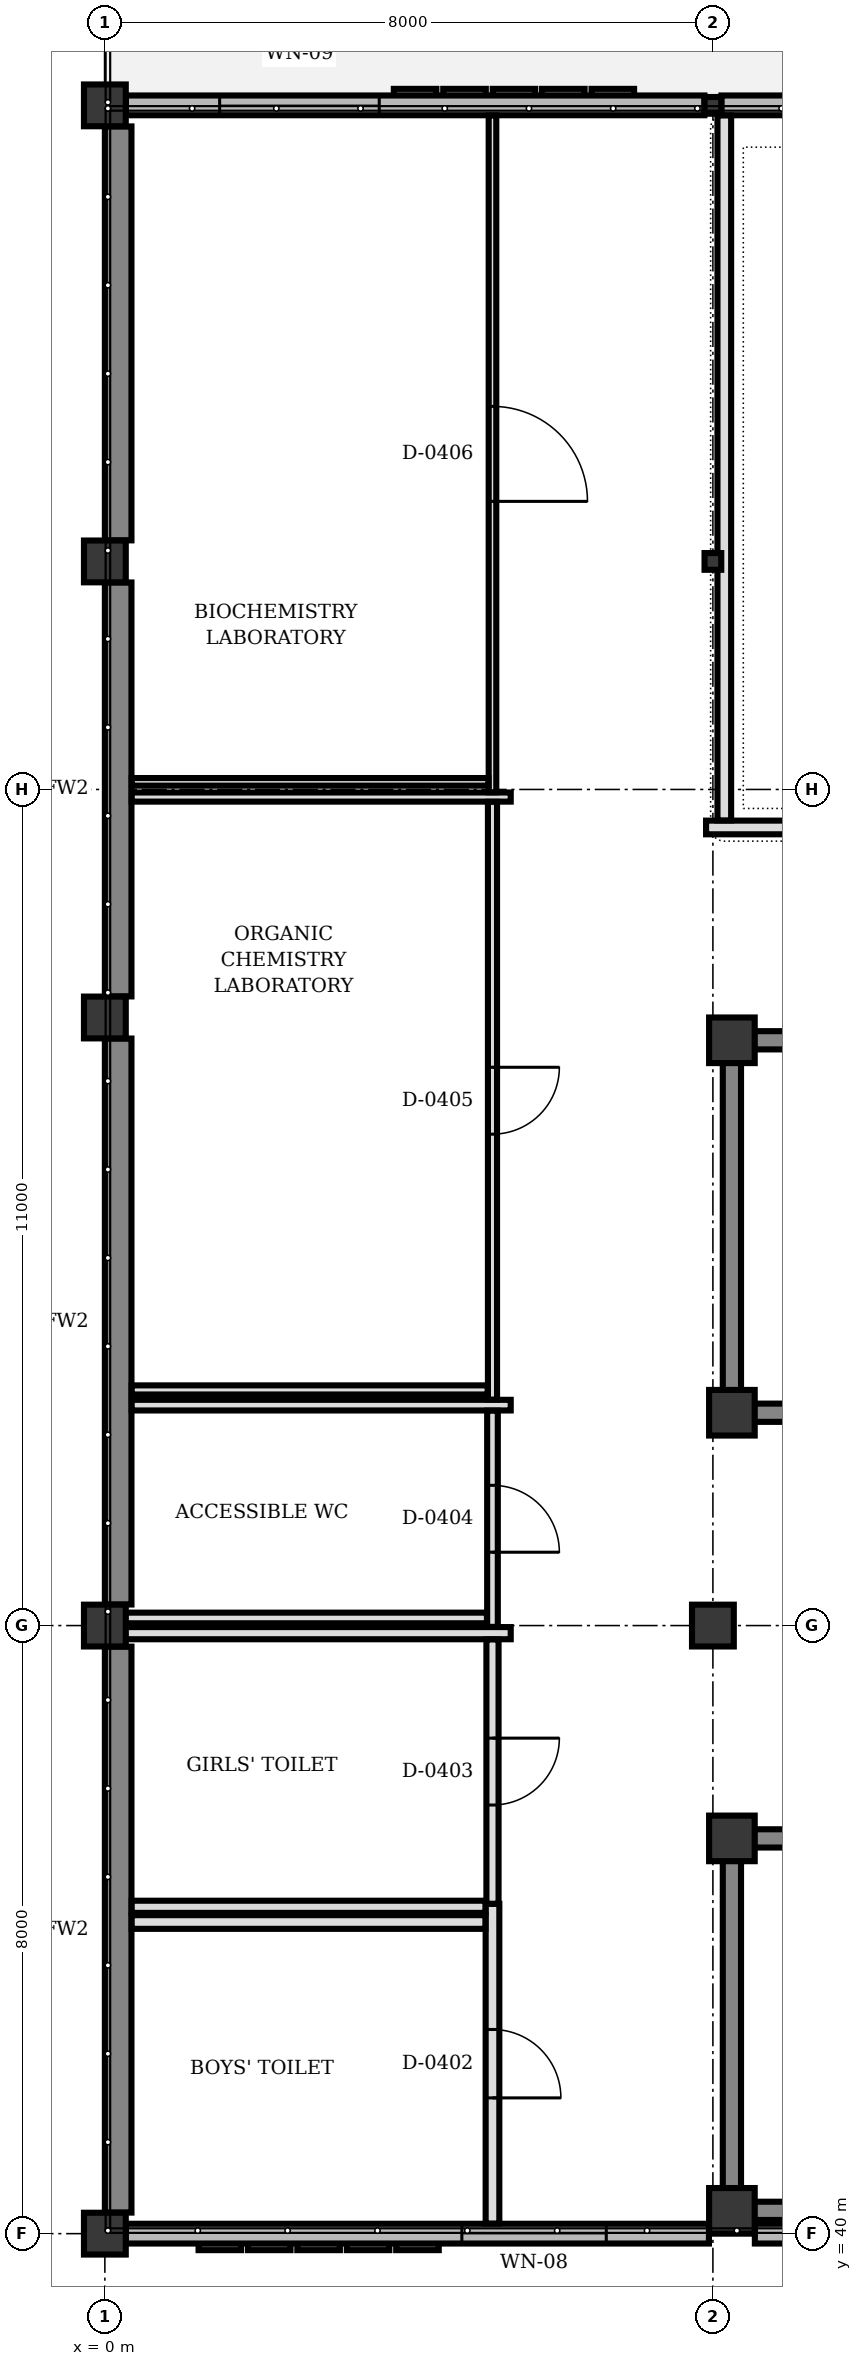
"""IFC4 building model, lengths in metres.
Left out: names, types, materials, properties, quantities, classifications, styles, units other than length and angle.
Written with IfcOpenShell. Run it as: python <this file> out.ifc"""

import sys

from ifc_helpers import new_model, si_unit, direction, frame, frame_2d, origin, origin_2d, place, context, subcontext, project, spatial, rectangle, hollow_rectangle, extrude, element, fill, save


model = new_model("IFC4")
c1 = context("Model", 3, precision=1e-05, world=origin(), true_north=direction((0.0, 1.0)))
c2 = subcontext(c1, "Body", "Model", "MODEL_VIEW")
j1 = project(units=[si_unit("LENGTHUNIT", "METRE"), si_unit("PLANEANGLEUNIT", "RADIAN")], contexts=[c1])
p1 = place(None, origin())
s1 = spatial("IfcSite", under=j1, at=p1, CompositionType="ELEMENT")
p2 = place(p1, origin())
s2 = spatial("IfcBuilding", under=s1, at=p2, CompositionType="ELEMENT")
p3 = place(p2, frame((0.0, 0.0, 16.5)))
s3 = spatial("IfcBuildingStorey", under=s2, at=p3, CompositionType="ELEMENT", Elevation=16.5)
for number, where, z_axis, x_axis in (
    (1, (8.25, 40.3, 0.0), (0.0, 0.0, 1.0), (1.0, 0.0, 0.0)),
    (2, (8.25, 45.2, 0.0), (0.0, 0.0, 1.0), (1.0, 0.0, 0.0)),
    (3, (8.25, 50.8, 0.0), (0.0, 0.0, 1.0), (1.0, 0.0, 0.0)),
    (4, (8.25, 55.7, 0.0), (0.0, 0.0, 1.0), (1.0, 0.0, 0.0)),
):
    element("IfcColumn", number, at=place(p3, frame(where, z_axis=z_axis, x_axis=x_axis)), inside=s3, PredefinedType="COLUMN", context=c2, shape_type="SweptSolid", body=[
        extrude(rectangle(XDim=0.6, YDim=0.6, at=origin_2d()), origin(), (0.0, 0.0, 1.0), 4.0),
    ])
for number, where, z_axis, x_axis in (
    (5, (0.0, 40.0, 0.0), (0.0, 0.0, 1.0), (1.0, 0.0, 0.0)),
    (6, (0.0, 48.0, 0.0), (0.0, 0.0, 1.0), (1.0, 0.0, 0.0)),
    (7, (0.0, 56.0, 0.0), (0.0, 0.0, 1.0), (1.0, 0.0, 0.0)),
    (8, (0.0, 62.0, 0.0), (0.0, 0.0, 1.0), (1.0, 0.0, 0.0)),
    (9, (0.0, 68.0, 0.0), (0.0, 0.0, 1.0), (1.0, 0.0, 0.0)),
    (10, (8.0, 48.0, 0.0), (0.0, 0.0, 1.0), (1.0, 0.0, 0.0)),
):
    element("IfcColumn", number, at=place(p3, frame(where, z_axis=z_axis, x_axis=x_axis)), inside=s3, PredefinedType="COLUMN", context=c2, shape_type="SweptSolid", body=[
        extrude(rectangle(XDim=0.55, YDim=0.55, at=origin_2d()), origin(), (0.0, 0.0, 1.0), 4.0),
    ])
for number, where, z_axis, x_axis in (
    (11, (8.0, 62.0, 0.0), (0.0, 0.0, 1.0), (1.0, 0.0, 0.0)),
    (12, (8.0, 68.0, 0.0), (0.0, 0.0, 1.0), (1.0, 0.0, 0.0)),
):
    element("IfcColumn", number, at=place(p3, frame(where, z_axis=z_axis, x_axis=x_axis)), inside=s3, PredefinedType="COLUMN", context=c2, shape_type="SweptSolid", body=[
        extrude(hollow_rectangle(XDim=0.22, YDim=0.22, WallThickness=0.01, at=origin_2d()), origin(), (0.0, 0.0, 1.0), 4.0),
    ])
p4 = place(p3, frame((0.277, 68.0, 0.0), z_axis=(0.0, 0.0, 1.0), x_axis=(1.0, 0.0, 0.0)))
e13 = element("IfcWall", 13, at=p4, inside=s3, PredefinedType="SOLIDWALL", context=c2, shape_type="SweptSolid", body=[
    extrude(rectangle(XDim=7.611, YDim=0.26, at=frame_2d((3.805, 0.0))), origin(), (0.0, 0.0, 1.0), 3.068),
])
p5 = place(p4, frame((1.233, 0.0, 0.9)))
e14 = element("IfcOpeningElement", 14, at=p5, cuts=e13, PredefinedType="OPENING", context=c2, shape_type="SweptSolid", body=[
    extrude(rectangle(XDim=2.1, YDim=1.1, at=frame_2d((1.05, 0.55))), frame((0.0, 0.14, 0.0), z_axis=(0.0, -1.0, 0.0), x_axis=(1.0, 0.0, 0.0)), (0.0, 0.0, 1.0), 0.28),
])
p6 = place(p3, frame((8.112, 68.0, 0.0), z_axis=(0.0, 0.0, 1.0), x_axis=(1.0, 0.0, 0.0)))
e15 = element("IfcWall", 15, at=p6, inside=s3, PredefinedType="SOLIDWALL", context=c2, shape_type="SweptSolid", body=[
    extrude(rectangle(XDim=7.611, YDim=0.26, at=frame_2d((3.805, 0.0))), origin(), (0.0, 0.0, 1.0), 3.068),
])
p7 = place(p6, frame((3.256, 0.0, 0.0)))
e16 = element("IfcOpeningElement", 16, at=p7, cuts=e15, PredefinedType="OPENING", context=c2, shape_type="SweptSolid", body=[
    extrude(rectangle(XDim=1.1, YDim=2.25, at=frame_2d((0.55, 1.125))), frame((0.0, 0.14, 0.0), z_axis=(0.0, -1.0, 0.0), x_axis=(1.0, 0.0, 0.0)), (0.0, 0.0, 1.0), 0.28),
])
p8 = place(p3, frame((16.0, 40.0, 0.0), z_axis=(0.0, 0.0, 1.0), x_axis=(-1.0, 0.0, 0.0)))
e17 = element("IfcWall", 17, at=p8, inside=s3, PredefinedType="SOLIDWALL", context=c2, shape_type="SweptSolid", body=[
    extrude(rectangle(XDim=7.448, YDim=0.26, at=frame_2d((3.724, 0.0))), origin(), (0.0, 0.0, 1.0), 3.55),
])
p9 = place(p3, frame((7.948, 40.0, 0.0), z_axis=(0.0, 0.0, 1.0), x_axis=(-1.0, 0.0, 0.0)))
e18 = element("IfcWall", 18, at=p9, inside=s3, PredefinedType="SOLIDWALL", context=c2, shape_type="SweptSolid", body=[
    extrude(rectangle(XDim=7.671, YDim=0.26, at=frame_2d((3.835, 0.0))), origin(), (0.0, 0.0, 1.0), 3.55),
])
p10 = place(p9, frame((1.351, 0.0, 0.9)))
e19 = element("IfcOpeningElement", 19, at=p10, cuts=e18, PredefinedType="OPENING", context=c2, shape_type="SweptSolid", body=[
    extrude(rectangle(XDim=1.9, YDim=1.1, at=frame_2d((0.95, 0.55))), frame((0.0, 0.14, 0.0), z_axis=(0.0, -1.0, 0.0), x_axis=(1.0, 0.0, 0.0)), (0.0, 0.0, 1.0), 0.28),
])
p11 = place(p3, frame((0.175, 40.277, 0.0), z_axis=(0.0, 0.0, 1.0), x_axis=(0.0, 1.0, 0.0)))
e20 = element("IfcWall", 20, at=p11, inside=s3, PredefinedType="SHEAR", context=c2, shape_type="SweptSolid", body=[
    extrude(rectangle(XDim=7.446, YDim=0.35, at=frame_2d((3.723, 0.0))), origin(), (0.0, 0.0, 1.0), 3.149),
])
p12 = place(p3, frame((0.175, 48.277, 0.0), z_axis=(0.0, 0.0, 1.0), x_axis=(0.0, 1.0, 0.0)))
e21 = element("IfcWall", 21, at=p12, inside=s3, PredefinedType="SHEAR", context=c2, shape_type="SweptSolid", body=[
    extrude(rectangle(XDim=7.446, YDim=0.35, at=frame_2d((3.723, 0.0))), origin(), (0.0, 0.0, 1.0), 3.223),
])
p13 = place(p3, frame((0.175, 56.277, 0.0), z_axis=(0.0, 0.0, 1.0), x_axis=(0.0, 1.0, 0.0)))
e22 = element("IfcWall", 22, at=p13, inside=s3, PredefinedType="SHEAR", context=c2, shape_type="SweptSolid", body=[
    extrude(rectangle(XDim=5.446, YDim=0.35, at=frame_2d((2.723, 0.0))), origin(), (0.0, 0.0, 1.0), 3.295),
])
p14 = place(p3, frame((0.175, 62.277, 0.0), z_axis=(0.0, 0.0, 1.0), x_axis=(0.0, 1.0, 0.0)))
e23 = element("IfcWall", 23, at=p14, inside=s3, PredefinedType="SHEAR", context=c2, shape_type="SweptSolid", body=[
    extrude(rectangle(XDim=5.446, YDim=0.35, at=frame_2d((2.723, 0.0))), origin(), (0.0, 0.0, 1.0), 3.345),
])
p15 = place(p3, frame((8.25, 40.592, 0.0), z_axis=(0.0, 0.0, 1.0), x_axis=(0.0, 1.0, 0.0)))
e24 = element("IfcWall", 24, at=p15, inside=s3, PredefinedType="SHEAR", context=c2, shape_type="SweptSolid", body=[
    extrude(rectangle(XDim=4.316, YDim=0.24, at=frame_2d((2.158, 0.0))), origin(), (0.0, 0.0, 1.0), 3.74),
])
p16 = place(p3, frame((15.927, 40.3, 0.0), z_axis=(0.0, 0.0, 1.0), x_axis=(-1.0, 0.0, 0.0)))
e25 = element("IfcWall", 25, at=p16, inside=s3, PredefinedType="SHEAR", context=c2, shape_type="SweptSolid", body=[
    extrude(rectangle(XDim=7.385, YDim=0.24, at=frame_2d((3.692, 0.0))), origin(), (0.0, 0.0, 1.0), 3.74),
])
p17 = place(p3, frame((15.758, 45.2, 0.0), z_axis=(0.0, 0.0, 1.0), x_axis=(-1.0, 0.0, 0.0)))
e26 = element("IfcWall", 26, at=p17, inside=s3, PredefinedType="SHEAR", context=c2, shape_type="SweptSolid", body=[
    extrude(rectangle(XDim=7.216, YDim=0.24, at=frame_2d((3.608, 0.0))), origin(), (0.0, 0.0, 1.0), 3.74),
])
p18 = place(p17, frame((5.694, 0.0, 0.0)))
e27 = element("IfcOpeningElement", 27, at=p18, cuts=e26, PredefinedType="OPENING", context=c2, shape_type="SweptSolid", body=[
    extrude(rectangle(XDim=0.88, YDim=2.1, at=frame_2d((0.44, 1.05))), frame((0.0, 0.13, 0.0), z_axis=(0.0, -1.0, 0.0), x_axis=(1.0, 0.0, 0.0)), (0.0, 0.0, 1.0), 0.26),
])
p19 = place(p3, frame((8.25, 51.092, 0.0), z_axis=(0.0, 0.0, 1.0), x_axis=(0.0, 1.0, 0.0)))
e28 = element("IfcWall", 28, at=p19, inside=s3, PredefinedType="SHEAR", context=c2, shape_type="SweptSolid", body=[
    extrude(rectangle(XDim=4.316, YDim=0.24, at=frame_2d((2.158, 0.0))), origin(), (0.0, 0.0, 1.0), 3.74),
])
p20 = place(p3, frame((15.758, 50.8, 0.0), z_axis=(0.0, 0.0, 1.0), x_axis=(-1.0, 0.0, 0.0)))
e29 = element("IfcWall", 29, at=p20, inside=s3, PredefinedType="SHEAR", context=c2, shape_type="SweptSolid", body=[
    extrude(rectangle(XDim=7.216, YDim=0.24, at=frame_2d((3.608, 0.0))), origin(), (0.0, 0.0, 1.0), 3.74),
])
p21 = place(p20, frame((5.694, 0.0, 0.0)))
e30 = element("IfcOpeningElement", 30, at=p21, cuts=e29, PredefinedType="OPENING", context=c2, shape_type="SweptSolid", body=[
    extrude(rectangle(XDim=0.88, YDim=2.1, at=frame_2d((0.44, 1.05))), frame((0.0, 0.13, 0.0), z_axis=(0.0, -1.0, 0.0), x_axis=(1.0, 0.0, 0.0)), (0.0, 0.0, 1.0), 0.26),
])
p22 = place(p3, frame((15.927, 55.7, 0.0), z_axis=(0.0, 0.0, 1.0), x_axis=(-1.0, 0.0, 0.0)))
e31 = element("IfcWall", 31, at=p22, inside=s3, PredefinedType="SHEAR", context=c2, shape_type="SweptSolid", body=[
    extrude(rectangle(XDim=7.385, YDim=0.24, at=frame_2d((3.692, 0.0))), origin(), (0.0, 0.0, 1.0), 3.74),
])
p23 = place(p3, frame((15.757, 58.5, 0.0), z_axis=(0.0, 0.0, 1.0), x_axis=(-1.0, 0.0, 0.0)))
e32 = element("IfcWall", 32, at=p23, inside=s3, PredefinedType="PARTITIONING", context=c2, shape_type="SweptSolid", body=[
    extrude(rectangle(XDim=7.847, YDim=0.18, at=frame_2d((3.924, 0.0))), origin(), (0.0, 0.0, 1.0), 3.7),
])
p24 = place(p23, frame((3.483, 0.0, 0.0)))
e33 = element("IfcOpeningElement", 33, at=p24, cuts=e32, PredefinedType="OPENING", context=c2, shape_type="SweptSolid", body=[
    extrude(rectangle(XDim=0.88, YDim=2.1, at=frame_2d((0.44, 1.05))), frame((0.0, 0.1, 0.0), z_axis=(0.0, -1.0, 0.0), x_axis=(1.0, 0.0, 0.0)), (0.0, 0.0, 1.0), 0.2),
])
p25 = place(p3, frame((8.15, 58.593, 0.0), z_axis=(0.0, 0.0, 1.0), x_axis=(0.0, 1.0, 0.0)))
e34 = element("IfcWall", 34, at=p25, inside=s3, PredefinedType="PARTITIONING", context=c2, shape_type="SweptSolid", body=[
    extrude(rectangle(XDim=9.274, YDim=0.18, at=frame_2d((4.637, 0.0))), origin(), (0.0, 0.0, 1.0), 3.068),
])
p26 = place(p3, frame((5.1, 44.34, 0.0), z_axis=(0.0, 0.0, 1.0), x_axis=(0.0, -1.0, 0.0)))
e35 = element("IfcWall", 35, at=p26, inside=s3, PredefinedType="PARTITIONING", context=c2, shape_type="SweptSolid", body=[
    extrude(rectangle(XDim=4.207, YDim=0.18, at=frame_2d((2.104, 0.0))), origin(), (0.0, 0.0, 1.0), 3.7),
])
p27 = place(p26, frame((1.654, 0.0, 0.0)))
e36 = element("IfcOpeningElement", 36, at=p27, cuts=e35, PredefinedType="OPENING", context=c2, shape_type="SweptSolid", body=[
    extrude(rectangle(XDim=0.9, YDim=2.2, at=frame_2d((0.45, 1.1))), frame((0.0, 0.1, 0.0), z_axis=(0.0, -1.0, 0.0), x_axis=(1.0, 0.0, 0.0)), (0.0, 0.0, 1.0), 0.2),
])
p28 = place(p3, frame((0.353, 44.1, 0.0), z_axis=(0.0, 0.0, 1.0), x_axis=(1.0, 0.0, 0.0)))
e37 = element("IfcWall", 37, at=p28, inside=s3, PredefinedType="PARTITIONING", context=c2, shape_type="SweptSolid", body=[
    extrude(rectangle(XDim=4.654, YDim=0.18, at=frame_2d((2.327, 0.0))), origin(), (0.0, 0.0, 1.0), 3.7),
])
p29 = place(p3, frame((0.267, 47.9, 0.0), z_axis=(0.0, 0.0, 1.0), x_axis=(1.0, 0.0, 0.0)))
e38 = element("IfcWall", 38, at=p29, inside=s3, PredefinedType="PARTITIONING", context=c2, shape_type="SweptSolid", body=[
    extrude(rectangle(XDim=5.073, YDim=0.16, at=frame_2d((2.537, 0.0))), origin(), (0.0, 0.0, 1.0), 3.068),
])
p30 = place(p3, frame((5.1, 47.817, 0.0), z_axis=(0.0, 0.0, 1.0), x_axis=(0.0, -1.0, 0.0)))
e39 = element("IfcWall", 39, at=p30, inside=s3, PredefinedType="PARTITIONING", context=c2, shape_type="SweptSolid", body=[
    extrude(rectangle(XDim=3.477, YDim=0.16, at=frame_2d((1.738, 0.0))), origin(), (0.0, 0.0, 1.0), 3.068),
])
p31 = place(p30, frame((1.298, 0.0, 0.0)))
e40 = element("IfcOpeningElement", 40, at=p31, cuts=e39, PredefinedType="OPENING", context=c2, shape_type="SweptSolid", body=[
    extrude(rectangle(XDim=0.88, YDim=2.1, at=frame_2d((0.44, 1.05))), frame((0.0, 0.09, 0.0), z_axis=(0.0, -1.0, 0.0), x_axis=(1.0, 0.0, 0.0)), (0.0, 0.0, 1.0), 0.18),
])
p32 = place(p3, frame((5.007, 44.3, 0.0), z_axis=(0.0, 0.0, 1.0), x_axis=(-1.0, 0.0, 0.0)))
e41 = element("IfcWall", 41, at=p32, inside=s3, PredefinedType="PARTITIONING", context=c2, shape_type="SweptSolid", body=[
    extrude(rectangle(XDim=4.654, YDim=0.16, at=frame_2d((2.327, 0.0))), origin(), (0.0, 0.0, 1.0), 3.7),
])
p33 = place(p3, frame((0.353, 50.9, 0.0), z_axis=(0.0, 0.0, 1.0), x_axis=(1.0, 0.0, 0.0)))
e42 = element("IfcWall", 42, at=p33, inside=s3, PredefinedType="PARTITIONING", context=c2, shape_type="SweptSolid", body=[
    extrude(rectangle(XDim=4.987, YDim=0.14, at=frame_2d((2.494, 0.0))), origin(), (0.0, 0.0, 1.0), 3.7),
])
p34 = place(p3, frame((5.1, 50.827, 0.0), z_axis=(0.0, 0.0, 1.0), x_axis=(0.0, -1.0, 0.0)))
e43 = element("IfcWall", 43, at=p34, inside=s3, PredefinedType="PARTITIONING", context=c2, shape_type="SweptSolid", body=[
    extrude(rectangle(XDim=2.844, YDim=0.14, at=frame_2d((1.422, 0.0))), origin(), (0.0, 0.0, 1.0), 3.068),
])
p35 = place(p34, frame((0.982, 0.0, 0.0)))
e44 = element("IfcOpeningElement", 44, at=p35, cuts=e43, PredefinedType="OPENING", context=c2, shape_type="SweptSolid", body=[
    extrude(rectangle(XDim=0.88, YDim=2.1, at=frame_2d((0.44, 1.05))), frame((0.0, 0.08, 0.0), z_axis=(0.0, -1.0, 0.0), x_axis=(1.0, 0.0, 0.0)), (0.0, 0.0, 1.0), 0.16),
])
p36 = place(p3, frame((5.027, 48.1, 0.0), z_axis=(0.0, 0.0, 1.0), x_axis=(-1.0, 0.0, 0.0)))
e45 = element("IfcWall", 45, at=p36, inside=s3, PredefinedType="PARTITIONING", context=c2, shape_type="SweptSolid", body=[
    extrude(rectangle(XDim=4.76, YDim=0.14, at=frame_2d((2.38, 0.0))), origin(), (0.0, 0.0, 1.0), 3.068),
])
p37 = place(p3, frame((0.353, 58.9, 0.0), z_axis=(0.0, 0.0, 1.0), x_axis=(1.0, 0.0, 0.0)))
e46 = element("IfcWall", 46, at=p37, inside=s3, PredefinedType="PARTITIONING", context=c2, shape_type="SweptSolid", body=[
    extrude(rectangle(XDim=4.987, YDim=0.12, at=frame_2d((2.494, 0.0))), origin(), (0.0, 0.0, 1.0), 3.7),
])
p38 = place(p3, frame((5.1, 58.837, 0.0), z_axis=(0.0, 0.0, 1.0), x_axis=(0.0, -1.0, 0.0)))
e47 = element("IfcWall", 47, at=p38, inside=s3, PredefinedType="PARTITIONING", context=c2, shape_type="SweptSolid", body=[
    extrude(rectangle(XDim=7.864, YDim=0.12, at=frame_2d((3.932, 0.0))), origin(), (0.0, 0.0, 1.0), 3.7),
])
p39 = place(p38, frame((3.492, 0.0, 0.0)))
e48 = element("IfcOpeningElement", 48, at=p39, cuts=e47, PredefinedType="OPENING", context=c2, shape_type="SweptSolid", body=[
    extrude(rectangle(XDim=0.88, YDim=2.1, at=frame_2d((0.44, 1.05))), frame((0.0, 0.07, 0.0), z_axis=(0.0, -1.0, 0.0), x_axis=(1.0, 0.0, 0.0)), (0.0, 0.0, 1.0), 0.14),
])
p40 = place(p3, frame((5.037, 51.1, 0.0), z_axis=(0.0, 0.0, 1.0), x_axis=(-1.0, 0.0, 0.0)))
e49 = element("IfcWall", 49, at=p40, inside=s3, PredefinedType="PARTITIONING", context=c2, shape_type="SweptSolid", body=[
    extrude(rectangle(XDim=4.684, YDim=0.12, at=frame_2d((2.342, 0.0))), origin(), (0.0, 0.0, 1.0), 3.7),
])
p41 = place(p3, frame((5.1, 67.867, 0.0), z_axis=(0.0, 0.0, 1.0), x_axis=(0.0, -1.0, 0.0)))
e50 = element("IfcWall", 50, at=p41, inside=s3, PredefinedType="PARTITIONING", context=c2, shape_type="SweptSolid", body=[
    extrude(rectangle(XDim=8.904, YDim=0.1, at=frame_2d((4.452, 0.0))), origin(), (0.0, 0.0, 1.0), 3.068),
])
p42 = place(p41, frame((3.827, 0.0, 0.0)))
e51 = element("IfcOpeningElement", 51, at=p42, cuts=e50, PredefinedType="OPENING", context=c2, shape_type="SweptSolid", body=[
    extrude(rectangle(XDim=1.25, YDim=2.2, at=frame_2d((0.625, 1.1))), frame((0.0, 0.06, 0.0), z_axis=(0.0, -1.0, 0.0), x_axis=(1.0, 0.0, 0.0)), (0.0, 0.0, 1.0), 0.12),
])
p43 = place(p3, frame((5.047, 59.1, 0.0), z_axis=(0.0, 0.0, 1.0), x_axis=(-1.0, 0.0, 0.0)))
e52 = element("IfcWall", 52, at=p43, inside=s3, PredefinedType="PARTITIONING", context=c2, shape_type="SweptSolid", body=[
    extrude(rectangle(XDim=4.694, YDim=0.1, at=frame_2d((2.347, 0.0))), origin(), (0.0, 0.0, 1.0), 3.7),
])
p44 = place(p5, origin())
e53 = element("IfcWindow", 53, at=p44, inside=s3, PartitioningType="SINGLE_PANEL", PredefinedType="WINDOW", context=c2, shape_type="SweptSolid", body=[
    extrude(rectangle(XDim=2.1, YDim=1.1, at=frame_2d((1.05, 0.55))), frame((0.0, 0.03, 0.0), z_axis=(0.0, -1.0, 0.0), x_axis=(1.0, 0.0, 0.0)), (0.0, 0.0, 1.0), 0.06),
])
fill(e14, e53)
p45 = place(p10, origin())
e54 = element("IfcWindow", 54, at=p45, inside=s3, PartitioningType="SINGLE_PANEL", PredefinedType="WINDOW", context=c2, shape_type="SweptSolid", body=[
    extrude(rectangle(XDim=1.9, YDim=1.1, at=frame_2d((0.95, 0.55))), frame((0.0, 0.03, 0.0), z_axis=(0.0, -1.0, 0.0), x_axis=(1.0, 0.0, 0.0)), (0.0, 0.0, 1.0), 0.06),
])
fill(e19, e54)
p46 = place(p27, origin())
e55 = element("IfcDoor", 55, at=p46, inside=s3, OperationType="SINGLE_SWING_RIGHT", PredefinedType="DOOR", context=c2, shape_type="SweptSolid", body=[
    extrude(rectangle(XDim=0.9, YDim=2.2, at=frame_2d((0.45, 1.1))), frame((0.0, 0.025, 0.0), z_axis=(0.0, -1.0, 0.0), x_axis=(1.0, 0.0, 0.0)), (0.0, 0.0, 1.0), 0.05),
])
fill(e36, e55)
p47 = place(p31, origin())
e56 = element("IfcDoor", 56, at=p47, inside=s3, OperationType="SINGLE_SWING_LEFT", PredefinedType="DOOR", context=c2, shape_type="SweptSolid", body=[
    extrude(rectangle(XDim=0.88, YDim=2.1, at=frame_2d((0.44, 1.05))), frame((0.0, 0.025, 0.0), z_axis=(0.0, -1.0, 0.0), x_axis=(1.0, 0.0, 0.0)), (0.0, 0.0, 1.0), 0.05),
])
fill(e40, e56)
p48 = place(p35, origin())
e57 = element("IfcDoor", 57, at=p48, inside=s3, OperationType="SINGLE_SWING_RIGHT", PredefinedType="DOOR", context=c2, shape_type="SweptSolid", body=[
    extrude(rectangle(XDim=0.88, YDim=2.1, at=frame_2d((0.44, 1.05))), frame((0.0, 0.025, 0.0), z_axis=(0.0, -1.0, 0.0), x_axis=(1.0, 0.0, 0.0)), (0.0, 0.0, 1.0), 0.05),
])
fill(e44, e57)
p49 = place(p39, origin())
e58 = element("IfcDoor", 58, at=p49, inside=s3, OperationType="SINGLE_SWING_LEFT", PredefinedType="DOOR", context=c2, shape_type="SweptSolid", body=[
    extrude(rectangle(XDim=0.88, YDim=2.1, at=frame_2d((0.44, 1.05))), frame((0.0, 0.025, 0.0), z_axis=(0.0, -1.0, 0.0), x_axis=(1.0, 0.0, 0.0)), (0.0, 0.0, 1.0), 0.05),
])
fill(e48, e58)
p50 = place(p42, origin())
e59 = element("IfcDoor", 59, at=p50, inside=s3, OperationType="SINGLE_SWING_RIGHT", PredefinedType="DOOR", context=c2, shape_type="SweptSolid", body=[
    extrude(rectangle(XDim=1.25, YDim=2.2, at=frame_2d((0.625, 1.1))), frame((0.0, 0.025, 0.0), z_axis=(0.0, -1.0, 0.0), x_axis=(1.0, 0.0, 0.0)), (0.0, 0.0, 1.0), 0.05),
])
fill(e51, e59)
save(model, sys.argv[1])
